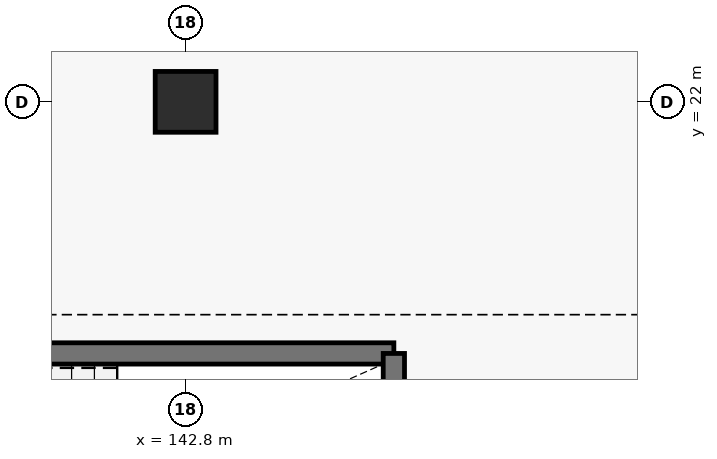
"""IFC4 building model, lengths in metres.
Left out: names, types, materials, properties, quantities, classifications, styles, units other than length and angle.
Written with IfcOpenShell. Run it as: python <this file> out.ifc"""

import sys

from ifc_helpers import new_model, si_unit, direction, frame, frame_2d, origin, origin_2d, place, context, subcontext, project, spatial, rectangle, extrude, element, save


model = new_model("IFC4")
c1 = context("Model", 3, precision=1e-05, world=origin(), true_north=direction((0.0, 1.0)))
c2 = subcontext(c1, "Body", "Model", "MODEL_VIEW")
j1 = project(units=[si_unit("LENGTHUNIT", "METRE"), si_unit("PLANEANGLEUNIT", "RADIAN")], contexts=[c1])
p1 = place(None, origin())
s1 = spatial("IfcSite", under=j1, at=p1, CompositionType="ELEMENT")
p2 = place(p1, origin())
s2 = spatial("IfcBuilding", under=s1, at=p2, CompositionType="ELEMENT")
p3 = place(p2, frame((0.0, 0.0, 5.44)))
s3 = spatial("IfcBuildingStorey", under=s2, at=p3, CompositionType="ELEMENT", Elevation=5.44)
p4 = place(p3, frame((142.8, 22.0, 0.0), z_axis=(0.0, 0.0, 1.0), x_axis=(1.0, 0.0, 0.0)))
e1 = element("IfcColumn", 1, at=p4, inside=s3, PredefinedType="COLUMN", context=c2, shape_type="SweptSolid", body=[
    extrude(rectangle(XDim=0.8, YDim=0.8, at=origin_2d()), origin(), (0.0, 0.0, 1.0), 4.16),
])
p5 = place(p3, frame((136.66, 18.69, 0.0), z_axis=(0.0, 0.0, 1.0), x_axis=(1.0, 0.0, 0.0)))
e2 = element("IfcWall", 2, at=p5, inside=s3, PredefinedType="SHEAR", context=c2, shape_type="SweptSolid", body=[
    extrude(rectangle(XDim=8.88, YDim=0.28, at=frame_2d((4.44, 0.0))), origin(), (0.0, 0.0, 1.0), 4.16),
])
p6 = place(p3, frame((145.54, 15.26, 0.0), z_axis=(0.0, 0.0, 1.0), x_axis=(0.0, 1.0, 0.0)))
e3 = element("IfcWall", 3, at=p6, inside=s3, PredefinedType="SHEAR", context=c2, shape_type="SweptSolid", body=[
    extrude(rectangle(XDim=3.43, YDim=0.28, at=frame_2d((1.715, 0.0))), origin(), (0.0, 0.0, 1.0), 4.16),
])
save(model, sys.argv[1])
